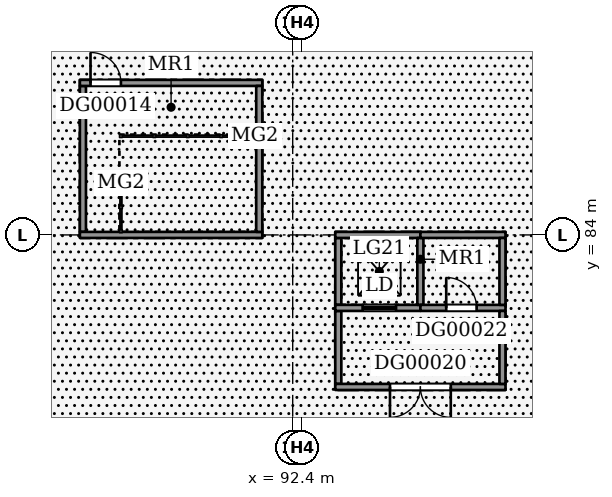
"""IFC4 building model, lengths in metres.
Left out: names, types, materials, properties, quantities, classifications, styles, units other than length and angle.
Written with IfcOpenShell. Run it as: python <this file> out.ifc"""

import sys

from ifc_helpers import new_model, si_unit, direction, frame, frame_2d, origin, place, context, subcontext, project, spatial, rectangle, extrude, element, fill, save


model = new_model("IFC4")
c1 = context("Model", 3, precision=1e-05, world=origin(), true_north=direction((0.0, 1.0)))
c2 = subcontext(c1, "Body", "Model", "MODEL_VIEW")
j1 = project(units=[si_unit("LENGTHUNIT", "METRE"), si_unit("PLANEANGLEUNIT", "RADIAN")], contexts=[c1])
p1 = place(None, origin())
s1 = spatial("IfcSite", under=j1, at=p1, CompositionType="ELEMENT")
p2 = place(p1, origin())
s2 = spatial("IfcBuilding", under=s1, at=p2, CompositionType="ELEMENT")
p3 = place(p2, origin())
s3 = spatial("IfcBuildingStorey", under=s2, at=p3, CompositionType="ELEMENT", Elevation=0.0)
p4 = place(p3, frame((85.5, 84.1, 0.0), z_axis=(0.0, 0.0, 1.0), x_axis=(0.0, 1.0, 0.0)))
e1 = element("IfcWall", 1, at=p4, inside=s3, PredefinedType="SOLIDWALL", context=c2, shape_type="SweptSolid", body=[
    extrude(rectangle(XDim=4.8, YDim=0.2, at=frame_2d((2.4, 0.0))), origin(), (0.0, 0.0, 1.0), 3.6),
])
p5 = place(p3, frame((85.4, 84.0, 0.0), z_axis=(0.0, 0.0, 1.0), x_axis=(1.0, 0.0, 0.0)))
e2 = element("IfcWall", 2, at=p5, inside=s3, PredefinedType="SOLIDWALL", context=c2, shape_type="SweptSolid", body=[
    extrude(rectangle(XDim=6.0, YDim=0.2, at=frame_2d((3.0, 0.0))), origin(), (0.0, 0.0, 1.0), 3.6),
])
p6 = place(p3, frame((85.4, 89.0, 0.0), z_axis=(0.0, 0.0, 1.0), x_axis=(1.0, 0.0, 0.0)))
e3 = element("IfcWall", 3, at=p6, inside=s3, PredefinedType="SOLIDWALL", context=c2, shape_type="SweptSolid", body=[
    extrude(rectangle(XDim=6.0, YDim=0.2, at=frame_2d((3.0, 0.0))), origin(), (0.0, 0.0, 1.0), 3.6),
])
p7 = place(p6, frame((0.35, 0.0, 0.0)))
e4 = element("IfcOpeningElement", 4, at=p7, cuts=e3, PredefinedType="OPENING", context=c2, shape_type="SweptSolid", body=[
    extrude(rectangle(XDim=1.0, YDim=2.1, at=frame_2d((0.5, 1.05))), frame((0.0, 0.11, 0.0), z_axis=(0.0, -1.0, 0.0), x_axis=(1.0, 0.0, 0.0)), (0.0, 0.0, 1.0), 0.22),
])
p8 = place(p3, frame((91.3, 84.1, 0.0), z_axis=(0.0, 0.0, 1.0), x_axis=(0.0, 1.0, 0.0)))
e5 = element("IfcWall", 5, at=p8, inside=s3, PredefinedType="SOLIDWALL", context=c2, shape_type="SweptSolid", body=[
    extrude(rectangle(XDim=4.8, YDim=0.2, at=frame_2d((2.4, 0.0))), origin(), (0.0, 0.0, 1.0), 3.6),
])
p9 = place(p3, frame((93.9, 79.1, 0.0), z_axis=(0.0, 0.0, 1.0), x_axis=(0.0, 1.0, 0.0)))
e6 = element("IfcWall", 6, at=p9, inside=s3, PredefinedType="SOLIDWALL", context=c2, shape_type="SweptSolid", body=[
    extrude(rectangle(XDim=2.4, YDim=0.2, at=frame_2d((1.2, 0.0))), origin(), (0.0, 0.0, 1.0), 3.6),
])
p10 = place(p3, frame((93.8, 79.0, 0.0), z_axis=(0.0, 0.0, 1.0), x_axis=(1.0, 0.0, 0.0)))
e7 = element("IfcWall", 7, at=p10, inside=s3, PredefinedType="SOLIDWALL", context=c2, shape_type="SweptSolid", body=[
    extrude(rectangle(XDim=5.6, YDim=0.2, at=frame_2d((2.8, 0.0))), origin(), (0.0, 0.0, 1.0), 3.6),
])
p11 = place(p10, frame((1.8, 0.0, 0.0)))
e8 = element("IfcOpeningElement", 8, at=p11, cuts=e7, PredefinedType="OPENING", context=c2, shape_type="SweptSolid", body=[
    extrude(rectangle(XDim=2.0, YDim=2.1, at=frame_2d((1.0, 1.05))), frame((0.0, 0.11, 0.0), z_axis=(0.0, -1.0, 0.0), x_axis=(1.0, 0.0, 0.0)), (0.0, 0.0, 1.0), 0.22),
])
p12 = place(p3, frame((93.9, 81.7, 0.0), z_axis=(0.0, 0.0, 1.0), x_axis=(0.0, 1.0, 0.0)))
e9 = element("IfcWall", 9, at=p12, inside=s3, PredefinedType="SOLIDWALL", context=c2, shape_type="SweptSolid", body=[
    extrude(rectangle(XDim=2.2, YDim=0.2, at=frame_2d((1.1, 0.0))), origin(), (0.0, 0.0, 1.0), 3.6),
])
p13 = place(p3, frame((93.8, 81.6, 0.0), z_axis=(0.0, 0.0, 1.0), x_axis=(1.0, 0.0, 0.0)))
e10 = element("IfcWall", 10, at=p13, inside=s3, PredefinedType="SOLIDWALL", context=c2, shape_type="SweptSolid", body=[
    extrude(rectangle(XDim=2.8, YDim=0.2, at=frame_2d((1.4, 0.0))), origin(), (0.0, 0.0, 1.0), 3.6),
])
p14 = place(p13, frame((0.9, 0.0, 0.0)))
e11 = element("IfcOpeningElement", 11, at=p14, cuts=e10, PredefinedType="OPENING", context=c2, shape_type="SweptSolid", body=[
    extrude(rectangle(XDim=1.1, YDim=2.1, at=frame_2d((0.55, 1.05))), frame((0.0, 0.11, 0.0), z_axis=(0.0, -1.0, 0.0), x_axis=(1.0, 0.0, 0.0)), (0.0, 0.0, 1.0), 0.22),
])
p15 = place(p3, frame((93.8, 84.0, 0.0), z_axis=(0.0, 0.0, 1.0), x_axis=(1.0, 0.0, 0.0)))
e12 = element("IfcWall", 12, at=p15, inside=s3, PredefinedType="SOLIDWALL", context=c2, shape_type="SweptSolid", body=[
    extrude(rectangle(XDim=2.8, YDim=0.2, at=frame_2d((1.4, 0.0))), origin(), (0.0, 0.0, 1.0), 3.6),
])
p16 = place(p3, frame((96.6, 81.7, 0.0), z_axis=(0.0, 0.0, 1.0), x_axis=(0.0, 1.0, 0.0)))
e13 = element("IfcWall", 13, at=p16, inside=s3, PredefinedType="SOLIDWALL", context=c2, shape_type="SweptSolid", body=[
    extrude(rectangle(XDim=2.2, YDim=0.2, at=frame_2d((1.1, 0.0))), origin(), (0.0, 0.0, 1.0), 3.6),
])
p17 = place(p3, frame((96.6, 81.6, 0.0), z_axis=(0.0, 0.0, 1.0), x_axis=(1.0, 0.0, 0.0)))
e14 = element("IfcWall", 14, at=p17, inside=s3, PredefinedType="SOLIDWALL", context=c2, shape_type="SweptSolid", body=[
    extrude(rectangle(XDim=2.8, YDim=0.2, at=frame_2d((1.4, 0.0))), origin(), (0.0, 0.0, 1.0), 3.6),
])
p18 = place(p17, frame((0.85, 0.0, 0.0)))
e15 = element("IfcOpeningElement", 15, at=p18, cuts=e14, PredefinedType="OPENING", context=c2, shape_type="SweptSolid", body=[
    extrude(rectangle(XDim=1.0, YDim=2.1, at=frame_2d((0.5, 1.05))), frame((0.0, 0.11, 0.0), z_axis=(0.0, -1.0, 0.0), x_axis=(1.0, 0.0, 0.0)), (0.0, 0.0, 1.0), 0.22),
])
p19 = place(p3, frame((96.6, 84.0, 0.0), z_axis=(0.0, 0.0, 1.0), x_axis=(1.0, 0.0, 0.0)))
e16 = element("IfcWall", 16, at=p19, inside=s3, PredefinedType="SOLIDWALL", context=c2, shape_type="SweptSolid", body=[
    extrude(rectangle(XDim=2.8, YDim=0.2, at=frame_2d((1.4, 0.0))), origin(), (0.0, 0.0, 1.0), 3.6),
])
p20 = place(p3, frame((99.3, 79.1, 0.0), z_axis=(0.0, 0.0, 1.0), x_axis=(0.0, 1.0, 0.0)))
e17 = element("IfcWall", 17, at=p20, inside=s3, PredefinedType="SOLIDWALL", context=c2, shape_type="SweptSolid", body=[
    extrude(rectangle(XDim=2.4, YDim=0.2, at=frame_2d((1.2, 0.0))), origin(), (0.0, 0.0, 1.0), 3.6),
])
p21 = place(p3, frame((99.3, 81.7, 0.0), z_axis=(0.0, 0.0, 1.0), x_axis=(0.0, 1.0, 0.0)))
e18 = element("IfcWall", 18, at=p21, inside=s3, PredefinedType="SOLIDWALL", context=c2, shape_type="SweptSolid", body=[
    extrude(rectangle(XDim=2.2, YDim=0.2, at=frame_2d((1.1, 0.0))), origin(), (0.0, 0.0, 1.0), 3.6),
])
p22 = place(p7, origin())
e19 = element("IfcDoor", 19, at=p22, inside=s3, OperationType="SINGLE_SWING_LEFT", PredefinedType="DOOR", context=c2, shape_type="SweptSolid", body=[
    extrude(rectangle(XDim=1.0, YDim=2.1, at=frame_2d((0.5, 1.05))), frame((0.0, 0.025, 0.0), z_axis=(0.0, -1.0, 0.0), x_axis=(1.0, 0.0, 0.0)), (0.0, 0.0, 1.0), 0.05),
])
fill(e4, e19)
p23 = place(p11, frame((2.0, 0.0, 0.0), z_axis=(0.0, 0.0, 1.0), x_axis=(-1.0, 0.0, 0.0)))
e20 = element("IfcDoor", 20, at=p23, inside=s3, OperationType="DOUBLE_DOOR_SINGLE_SWING", PredefinedType="DOOR", context=c2, shape_type="SweptSolid", body=[
    extrude(rectangle(XDim=2.0, YDim=2.1, at=frame_2d((1.0, 1.05))), frame((0.0, 0.025, 0.0), z_axis=(0.0, -1.0, 0.0), x_axis=(1.0, 0.0, 0.0)), (0.0, 0.0, 1.0), 0.05),
])
fill(e8, e20)
p24 = place(p14, origin())
e21 = element("IfcDoor", 21, at=p24, inside=s3, OperationType="SLIDING_TO_LEFT", PredefinedType="DOOR", context=c2, shape_type="SweptSolid", body=[
    extrude(rectangle(XDim=1.1, YDim=2.1, at=frame_2d((0.55, 1.05))), frame((0.0, 0.025, 0.0), z_axis=(0.0, -1.0, 0.0), x_axis=(1.0, 0.0, 0.0)), (0.0, 0.0, 1.0), 0.05),
])
fill(e11, e21)
p25 = place(p18, origin())
e22 = element("IfcDoor", 22, at=p25, inside=s3, OperationType="SINGLE_SWING_LEFT", PredefinedType="DOOR", context=c2, shape_type="SweptSolid", body=[
    extrude(rectangle(XDim=1.0, YDim=2.1, at=frame_2d((0.5, 1.05))), frame((0.0, 0.025, 0.0), z_axis=(0.0, -1.0, 0.0), x_axis=(1.0, 0.0, 0.0)), (0.0, 0.0, 1.0), 0.05),
])
fill(e15, e22)
save(model, sys.argv[1])
